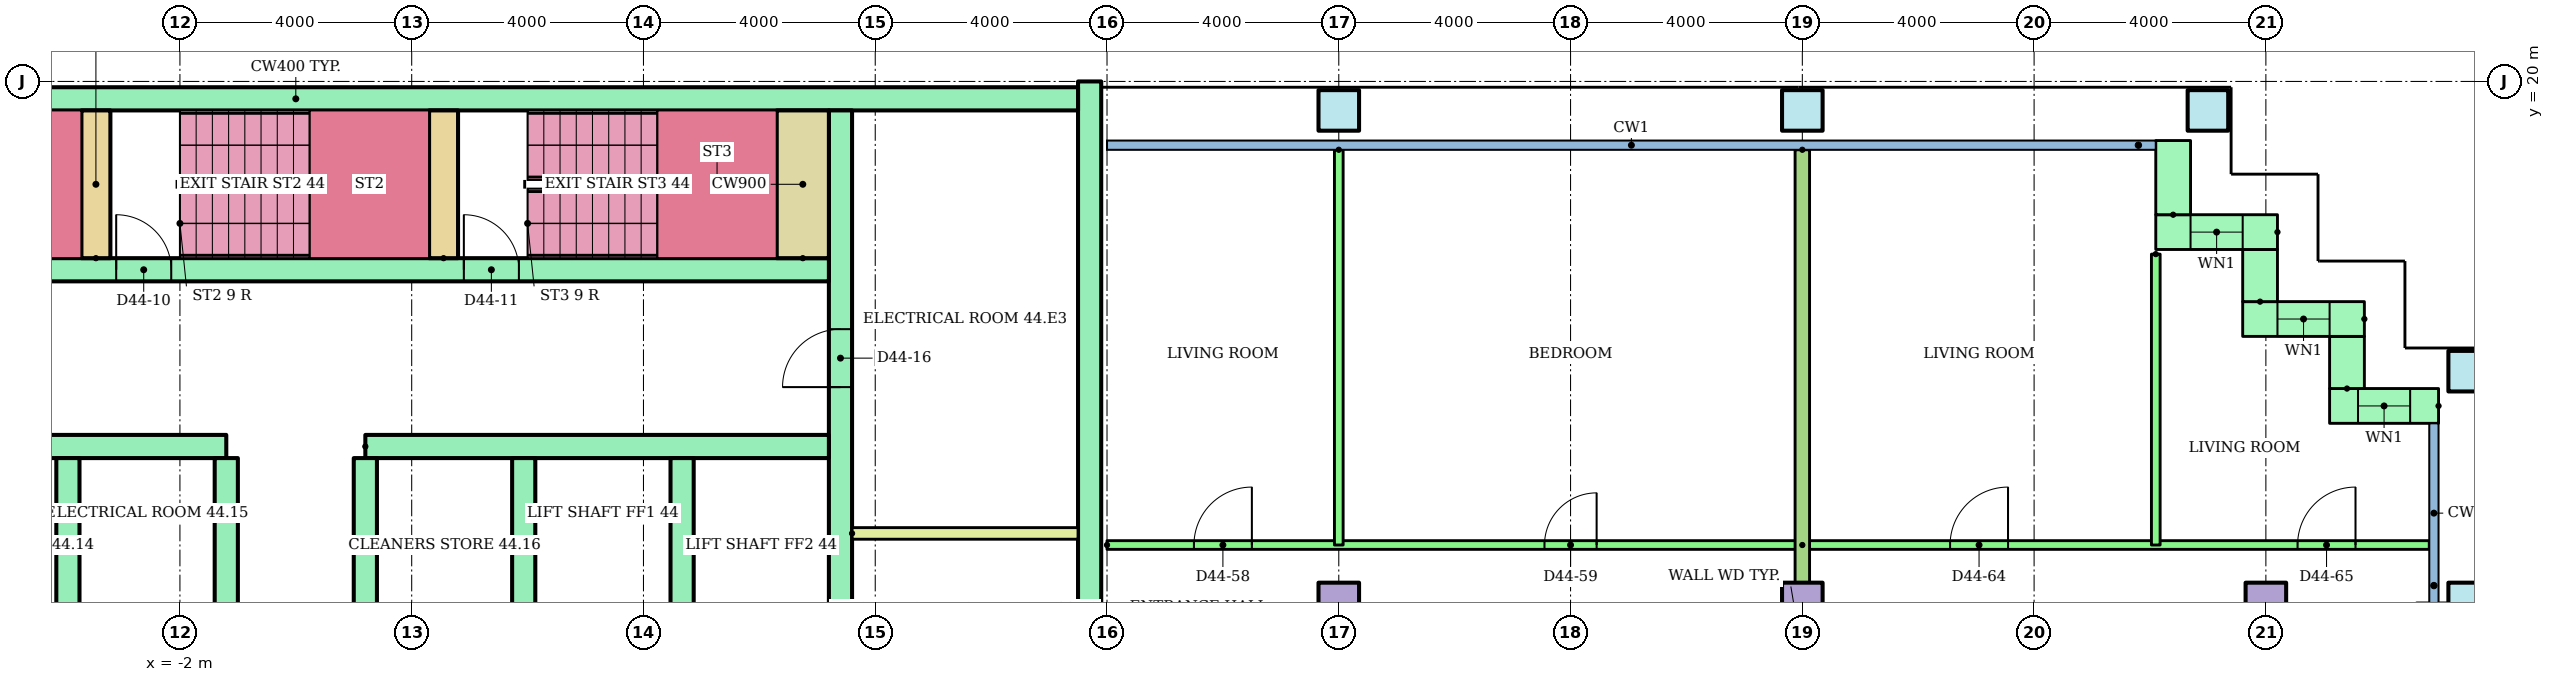
"""IFC4 building model, lengths in metres.
Left out: names, types, materials, properties, quantities, classifications, styles, units other than length and angle.
Written with IfcOpenShell. Run it as: python <this file> out.ifc"""

import sys

from ifc_helpers import new_model, si_unit, direction, frame, frame_2d, origin, origin_2d, place, context, subcontext, project, spatial, rectangle, hollow_rectangle, extrude, element, fill, save


model = new_model("IFC4")
c1 = context("Model", 3, precision=1e-05, world=origin(), true_north=direction((0.0, 1.0)))
c2 = subcontext(c1, "Body", "Model", "MODEL_VIEW")
j1 = project(units=[si_unit("LENGTHUNIT", "METRE"), si_unit("PLANEANGLEUNIT", "RADIAN")], contexts=[c1])
p1 = place(None, origin())
s1 = spatial("IfcSite", under=j1, at=p1, CompositionType="ELEMENT")
p2 = place(p1, origin())
s2 = spatial("IfcBuilding", under=s1, at=p2, CompositionType="ELEMENT")
p3 = place(p2, frame((0.0, 0.0, 171.7)))
s3 = spatial("IfcBuildingStorey", under=s2, at=p3, CompositionType="ELEMENT", Elevation=171.7)
for number, where in (
    (1, (18.0, 11.0, 0.0)),
    (2, (26.0, 11.0, 0.0)),
    (3, (34.0, 11.0, 0.0)),
):
    element("IfcColumn", number, at=place(p3, frame(where)), inside=s3, PredefinedType="COLUMN", context=c2, shape_type="SweptSolid", body=[
        extrude(rectangle(XDim=0.7, YDim=0.7, at=origin_2d()), origin(), (0.0, 0.0, 1.0), 3.2),
    ])
for number, where in (
    (4, (37.5, 11.0, 0.0)),
    (5, (37.5, 15.0, 0.0)),
    (6, (18.0, 19.5, 0.0)),
    (7, (26.0, 19.5, 0.0)),
    (8, (33.0, 19.5, 0.0)),
):
    element("IfcColumn", number, at=place(p3, frame(where)), inside=s3, PredefinedType="COLUMN", context=c2, shape_type="SweptSolid", body=[
        extrude(hollow_rectangle(XDim=0.7, YDim=0.7, WallThickness=0.036, at=origin_2d()), origin(), (0.0, 0.0, 1.0), 3.2),
    ])
p4 = place(p3, frame((36.98, 14.4, 0.0), z_axis=(0.0, 0.0, 1.0), x_axis=(-1.0, 0.0, 0.0)))
e9 = element("IfcWall", 9, at=p4, inside=s3, PredefinedType="STANDARD", context=c2, shape_type="SweptSolid", body=[
    extrude(rectangle(XDim=1.88, YDim=0.6, at=frame_2d((0.94, 0.0))), origin(), (0.0, 0.0, 1.0), 2.92),
])
p5 = place(p4, frame((0.49, 0.0, 0.9)))
e10 = element("IfcOpeningElement", 10, at=p5, cuts=e9, PredefinedType="OPENING", context=c2, shape_type="SweptSolid", body=[
    extrude(rectangle(XDim=0.9, YDim=1.5, at=frame_2d((0.45, 0.75))), frame((0.0, 0.31, 0.0), z_axis=(0.0, -1.0, 0.0), x_axis=(1.0, 0.0, 0.0)), (0.0, 0.0, 1.0), 0.62),
])
p6 = place(p3, frame((35.4, 14.7, 0.0), z_axis=(0.0, 0.0, 1.0), x_axis=(0.0, 1.0, 0.0)))
e11 = element("IfcWall", 11, at=p6, inside=s3, PredefinedType="STANDARD", context=c2, shape_type="SweptSolid", body=[
    extrude(rectangle(XDim=0.9, YDim=0.6, at=frame_2d((0.45, 0.0))), origin(), (0.0, 0.0, 1.0), 2.92),
])
p7 = place(p3, frame((35.7, 15.9, 0.0), z_axis=(0.0, 0.0, 1.0), x_axis=(-1.0, 0.0, 0.0)))
e12 = element("IfcWall", 12, at=p7, inside=s3, PredefinedType="STANDARD", context=c2, shape_type="SweptSolid", body=[
    extrude(rectangle(XDim=2.1, YDim=0.6, at=frame_2d((1.05, 0.0))), origin(), (0.0, 0.0, 1.0), 2.92),
])
p8 = place(p7, frame((0.6, 0.0, 0.9)))
e13 = element("IfcOpeningElement", 13, at=p8, cuts=e12, PredefinedType="OPENING", context=c2, shape_type="SweptSolid", body=[
    extrude(rectangle(XDim=0.9, YDim=1.5, at=frame_2d((0.45, 0.75))), frame((0.0, 0.31, 0.0), z_axis=(0.0, -1.0, 0.0), x_axis=(1.0, 0.0, 0.0)), (0.0, 0.0, 1.0), 0.62),
])
p9 = place(p3, frame((33.9, 16.2, 0.0), z_axis=(0.0, 0.0, 1.0), x_axis=(0.0, 1.0, 0.0)))
e14 = element("IfcWall", 14, at=p9, inside=s3, PredefinedType="STANDARD", context=c2, shape_type="SweptSolid", body=[
    extrude(rectangle(XDim=0.9, YDim=0.6, at=frame_2d((0.45, 0.0))), origin(), (0.0, 0.0, 1.0), 2.92),
])
p10 = place(p3, frame((34.2, 17.4, 0.0), z_axis=(0.0, 0.0, 1.0), x_axis=(-1.0, 0.0, 0.0)))
e15 = element("IfcWall", 15, at=p10, inside=s3, PredefinedType="STANDARD", context=c2, shape_type="SweptSolid", body=[
    extrude(rectangle(XDim=2.1, YDim=0.6, at=frame_2d((1.05, 0.0))), origin(), (0.0, 0.0, 1.0), 2.92),
])
p11 = place(p10, frame((0.6, 0.0, 0.9)))
e16 = element("IfcOpeningElement", 16, at=p11, cuts=e15, PredefinedType="OPENING", context=c2, shape_type="SweptSolid", body=[
    extrude(rectangle(XDim=0.9, YDim=1.5, at=frame_2d((0.45, 0.75))), frame((0.0, 0.31, 0.0), z_axis=(0.0, -1.0, 0.0), x_axis=(1.0, 0.0, 0.0)), (0.0, 0.0, 1.0), 0.62),
])
p12 = place(p3, frame((32.4, 17.7, 0.0), z_axis=(0.0, 0.0, 1.0), x_axis=(0.0, 1.0, 0.0)))
e17 = element("IfcWall", 17, at=p12, inside=s3, PredefinedType="STANDARD", context=c2, shape_type="SweptSolid", body=[
    extrude(rectangle(XDim=1.28, YDim=0.6, at=frame_2d((0.64, 0.0))), origin(), (0.0, 0.0, 1.0), 2.92),
])
p13 = place(p3, frame((13.7, 3.0, 0.0), z_axis=(0.0, 0.0, 1.0), x_axis=(0.0, 1.0, 0.0)))
e18 = element("IfcWall", 18, at=p13, inside=s3, PredefinedType="SHEAR", context=c2, shape_type="SweptSolid", body=[
    extrude(rectangle(XDim=17.0, YDim=0.4, at=frame_2d((8.5, 0.0))), origin(), (0.0, 0.0, 1.0), 2.92),
])
p14 = place(p3, frame((-13.5, 19.7, 0.0)))
e19 = element("IfcWall", 19, at=p14, inside=s3, PredefinedType="SHEAR", context=c2, shape_type="SweptSolid", body=[
    extrude(rectangle(XDim=27.0, YDim=0.4, at=frame_2d((13.5, 0.0))), origin(), (0.0, 0.0, 1.0), 2.92),
])
p15 = place(p3, frame((9.4, 6.8, 0.0), z_axis=(0.0, 0.0, 1.0), x_axis=(0.0, 1.0, 0.0)))
e20 = element("IfcWall", 20, at=p15, inside=s3, PredefinedType="SHEAR", context=c2, shape_type="SweptSolid", body=[
    extrude(rectangle(XDim=12.7, YDim=0.4, at=frame_2d((6.35, 0.0))), origin(), (0.0, 0.0, 1.0), 2.92),
])
p16 = place(p15, frame((0.3, 0.0, 0.0)))
e21 = element("IfcOpeningElement", 21, at=p16, cuts=e20, PredefinedType="OPENING", context=c2, shape_type="SweptSolid", body=[
    extrude(rectangle(XDim=1.0, YDim=2.1, at=frame_2d((0.5, 1.05))), frame((0.0, 0.21, 0.0), z_axis=(0.0, -1.0, 0.0), x_axis=(1.0, 0.0, 0.0)), (0.0, 0.0, 1.0), 0.42),
])
p17 = place(p15, frame((2.05, 0.0, 0.0)))
e22 = element("IfcOpeningElement", 22, at=p17, cuts=e20, PredefinedType="OPENING", context=c2, shape_type="SweptSolid", body=[
    extrude(rectangle(XDim=1.0, YDim=2.1, at=frame_2d((0.5, 1.05))), frame((0.0, 0.21, 0.0), z_axis=(0.0, -1.0, 0.0), x_axis=(1.0, 0.0, 0.0)), (0.0, 0.0, 1.0), 0.42),
])
p18 = place(p15, frame((7.925, 0.0, 0.0)))
e23 = element("IfcOpeningElement", 23, at=p18, cuts=e20, PredefinedType="OPENING", context=c2, shape_type="SweptSolid", body=[
    extrude(rectangle(XDim=1.0, YDim=2.1, at=frame_2d((0.5, 1.05))), frame((0.0, 0.21, 0.0), z_axis=(0.0, -1.0, 0.0), x_axis=(1.0, 0.0, 0.0)), (0.0, 0.0, 1.0), 0.42),
])
for number, where in (
    (24, (-9.2, 13.7, 0.0)),
    (25, (1.2, 13.7, 0.0)),
):
    element("IfcWall", number, at=place(p3, frame(where)), inside=s3, PredefinedType="SHEAR", context=c2, shape_type="SweptSolid", body=[
        extrude(rectangle(XDim=8.0, YDim=0.4, at=frame_2d((4.0, 0.0))), origin(), (0.0, 0.0, 1.0), 2.92),
    ])
for number, where, z_axis, x_axis in (
    (26, (-3.933, 10.5, 0.0), (0.0, 0.0, 1.0), (0.0, 1.0, 0.0)),
    (27, (-1.2, 10.5, 0.0), (0.0, 0.0, 1.0), (0.0, 1.0, 0.0)),
    (28, (1.2, 10.5, 0.0), (0.0, 0.0, 1.0), (0.0, 1.0, 0.0)),
    (29, (3.933, 10.5, 0.0), (0.0, 0.0, 1.0), (0.0, 1.0, 0.0)),
    (30, (6.667, 10.5, 0.0), (0.0, 0.0, 1.0), (0.0, 1.0, 0.0)),
):
    element("IfcWall", number, at=place(p3, frame(where, z_axis=z_axis, x_axis=x_axis)), inside=s3, PredefinedType="SHEAR", context=c2, shape_type="SweptSolid", body=[
        extrude(rectangle(XDim=3.0, YDim=0.4, at=frame_2d((1.5, 0.0))), origin(), (0.0, 0.0, 1.0), 2.92),
    ])
p19 = place(p3, frame((-9.2, 16.75, 0.0)))
e31 = element("IfcWall", 31, at=p19, inside=s3, PredefinedType="SHEAR", context=c2, shape_type="SweptSolid", body=[
    extrude(rectangle(XDim=18.4, YDim=0.4, at=frame_2d((9.2, 0.0))), origin(), (0.0, 0.0, 1.0), 2.92),
])
p20 = place(p19, frame((0.1, 0.0, 0.0)))
e32 = element("IfcOpeningElement", 32, at=p20, cuts=e31, PredefinedType="OPENING", context=c2, shape_type="SweptSolid", body=[
    extrude(rectangle(XDim=0.95, YDim=2.1, at=frame_2d((0.475, 1.05))), frame((0.0, 0.21, 0.0), z_axis=(0.0, -1.0, 0.0), x_axis=(1.0, 0.0, 0.0)), (0.0, 0.0, 1.0), 0.42),
])
p21 = place(p19, frame((6.1, 0.0, 0.0)))
e33 = element("IfcOpeningElement", 33, at=p21, cuts=e31, PredefinedType="OPENING", context=c2, shape_type="SweptSolid", body=[
    extrude(rectangle(XDim=0.95, YDim=2.1, at=frame_2d((0.475, 1.05))), frame((0.0, 0.21, 0.0), z_axis=(0.0, -1.0, 0.0), x_axis=(1.0, 0.0, 0.0)), (0.0, 0.0, 1.0), 0.42),
])
p22 = place(p19, frame((12.1, 0.0, 0.0)))
e34 = element("IfcOpeningElement", 34, at=p22, cuts=e31, PredefinedType="OPENING", context=c2, shape_type="SweptSolid", body=[
    extrude(rectangle(XDim=0.95, YDim=2.1, at=frame_2d((0.475, 1.05))), frame((0.0, 0.21, 0.0), z_axis=(0.0, -1.0, 0.0), x_axis=(1.0, 0.0, 0.0)), (0.0, 0.0, 1.0), 0.42),
])
for number, where, z_axis, x_axis in (
    (35, (-3.45, 16.95, 0.0), (0.0, 0.0, 1.0), (0.0, 1.0, 0.0)),
    (36, (2.55, 16.95, 0.0), (0.0, 0.0, 1.0), (0.0, 1.0, 0.0)),
):
    element("IfcWall", number, at=place(p3, frame(where, z_axis=z_axis, x_axis=x_axis)), inside=s3, PredefinedType="SHEAR", context=c2, shape_type="SweptSolid", body=[
        extrude(rectangle(XDim=2.55, YDim=0.5, at=frame_2d((1.275, 0.0))), origin(), (0.0, 0.0, 1.0), 2.92),
    ])
p23 = place(p3, frame((8.75, 16.95, 0.0), z_axis=(0.0, 0.0, 1.0), x_axis=(0.0, 1.0, 0.0)))
e37 = element("IfcWall", 37, at=p23, inside=s3, PredefinedType="SHEAR", context=c2, shape_type="SweptSolid", body=[
    extrude(rectangle(XDim=2.55, YDim=0.9, at=frame_2d((1.275, 0.0))), origin(), (0.0, 0.0, 1.0), 2.92),
])
p24 = place(p3, frame((9.6, 12.2, 0.0)))
e38 = element("IfcWall", 38, at=p24, inside=s3, PredefinedType="PARTITIONING", context=c2, shape_type="SweptSolid", body=[
    extrude(rectangle(XDim=3.9, YDim=0.2, at=frame_2d((1.95, 0.0))), origin(), (0.0, 0.0, 1.0), 2.92),
])
p25 = place(p3, frame((14.0, 12.0, 0.0)))
e39 = element("IfcWall", 39, at=p25, inside=s3, PredefinedType="PARTITIONING", context=c2, shape_type="SweptSolid", body=[
    extrude(rectangle(XDim=12.0, YDim=0.15, at=frame_2d((6.0, 0.0))), origin(), (0.0, 0.0, 1.0), 2.4),
])
p26 = place(p25, frame((1.5, 0.0, 0.0)))
e40 = element("IfcOpeningElement", 40, at=p26, cuts=e39, PredefinedType="OPENING", context=c2, shape_type="SweptSolid", body=[
    extrude(rectangle(XDim=1.0, YDim=2.1, at=frame_2d((0.5, 1.05))), frame((0.0, 0.085, 0.0), z_axis=(0.0, -1.0, 0.0), x_axis=(1.0, 0.0, 0.0)), (0.0, 0.0, 1.0), 0.17),
])
p27 = place(p25, frame((7.55, 0.0, 0.0)))
e41 = element("IfcOpeningElement", 41, at=p27, cuts=e39, PredefinedType="OPENING", context=c2, shape_type="SweptSolid", body=[
    extrude(rectangle(XDim=0.9, YDim=2.1, at=frame_2d((0.45, 1.05))), frame((0.0, 0.085, 0.0), z_axis=(0.0, -1.0, 0.0), x_axis=(1.0, 0.0, 0.0)), (0.0, 0.0, 1.0), 0.17),
])
p28 = place(p3, frame((18.0, 18.821, 0.0), z_axis=(0.0, 0.0, 1.0), x_axis=(0.0, -1.0, 0.0)))
e42 = element("IfcWall", 42, at=p28, inside=s3, PredefinedType="PARTITIONING", context=c2, shape_type="SweptSolid", body=[
    extrude(rectangle(XDim=6.821, YDim=0.15, at=frame_2d((3.411, 0.0))), origin(), (0.0, 0.0, 1.0), 2.4),
])
p29 = place(p3, frame((26.0, 12.0, 0.0)))
e43 = element("IfcWall", 43, at=p29, inside=s3, PredefinedType="PARTITIONING", context=c2, shape_type="SweptSolid", body=[
    extrude(rectangle(XDim=10.82, YDim=0.15, at=frame_2d((5.41, 0.0))), origin(), (0.0, 0.0, 1.0), 2.4),
])
p30 = place(p29, frame((2.55, 0.0, 0.0)))
e44 = element("IfcOpeningElement", 44, at=p30, cuts=e43, PredefinedType="OPENING", context=c2, shape_type="SweptSolid", body=[
    extrude(rectangle(XDim=1.0, YDim=2.1, at=frame_2d((0.5, 1.05))), frame((0.0, 0.085, 0.0), z_axis=(0.0, -1.0, 0.0), x_axis=(1.0, 0.0, 0.0)), (0.0, 0.0, 1.0), 0.17),
])
p31 = place(p29, frame((8.547, 0.0, 0.0)))
e45 = element("IfcOpeningElement", 45, at=p31, cuts=e43, PredefinedType="OPENING", context=c2, shape_type="SweptSolid", body=[
    extrude(rectangle(XDim=1.0, YDim=2.1, at=frame_2d((0.5, 1.05))), frame((0.0, 0.085, 0.0), z_axis=(0.0, -1.0, 0.0), x_axis=(1.0, 0.0, 0.0)), (0.0, 0.0, 1.0), 0.17),
])
p32 = place(p3, frame((32.1, 17.02, 0.0), z_axis=(0.0, 0.0, 1.0), x_axis=(0.0, -1.0, 0.0)))
e46 = element("IfcWall", 46, at=p32, inside=s3, PredefinedType="PARTITIONING", context=c2, shape_type="SweptSolid", body=[
    extrude(rectangle(XDim=5.02, YDim=0.15, at=frame_2d((2.51, 0.0))), origin(), (0.0, 0.0, 1.0), 2.4),
])
p33 = place(p3, frame((26.0, 18.821, 0.0), z_axis=(0.0, 0.0, 1.0), x_axis=(0.0, -1.0, 0.0)))
e47 = element("IfcWall", 47, at=p33, inside=s3, PredefinedType="PARTITIONING", context=c2, shape_type="SweptSolid", body=[
    extrude(rectangle(XDim=17.421, YDim=0.25, at=frame_2d((8.71, 0.0))), origin(), (0.0, 0.0, 1.0), 2.4),
])
p34 = place(p5, origin())
e48 = element("IfcWindow", 48, at=p34, inside=s3, PartitioningType="SINGLE_PANEL", PredefinedType="WINDOW", context=c2, shape_type="SweptSolid", body=[
    extrude(rectangle(XDim=0.9, YDim=1.5, at=frame_2d((0.45, 0.75))), frame((0.0, 0.03, 0.0), z_axis=(0.0, -1.0, 0.0), x_axis=(1.0, 0.0, 0.0)), (0.0, 0.0, 1.0), 0.06),
])
fill(e10, e48)
p35 = place(p8, origin())
e49 = element("IfcWindow", 49, at=p35, inside=s3, PartitioningType="SINGLE_PANEL", PredefinedType="WINDOW", context=c2, shape_type="SweptSolid", body=[
    extrude(rectangle(XDim=0.9, YDim=1.5, at=frame_2d((0.45, 0.75))), frame((0.0, 0.03, 0.0), z_axis=(0.0, -1.0, 0.0), x_axis=(1.0, 0.0, 0.0)), (0.0, 0.0, 1.0), 0.06),
])
fill(e13, e49)
p36 = place(p11, origin())
e50 = element("IfcWindow", 50, at=p36, inside=s3, PartitioningType="SINGLE_PANEL", PredefinedType="WINDOW", context=c2, shape_type="SweptSolid", body=[
    extrude(rectangle(XDim=0.9, YDim=1.5, at=frame_2d((0.45, 0.75))), frame((0.0, 0.03, 0.0), z_axis=(0.0, -1.0, 0.0), x_axis=(1.0, 0.0, 0.0)), (0.0, 0.0, 1.0), 0.06),
])
fill(e16, e50)
p37 = place(p21, origin())
e51 = element("IfcDoor", 51, at=p37, inside=s3, OperationType="SINGLE_SWING_LEFT", PredefinedType="DOOR", context=c2, shape_type="SweptSolid", body=[
    extrude(rectangle(XDim=0.95, YDim=2.1, at=frame_2d((0.475, 1.05))), frame((0.0, 0.025, 0.0), z_axis=(0.0, -1.0, 0.0), x_axis=(1.0, 0.0, 0.0)), (0.0, 0.0, 1.0), 0.05),
])
fill(e33, e51)
p38 = place(p22, origin())
e52 = element("IfcDoor", 52, at=p38, inside=s3, OperationType="SINGLE_SWING_LEFT", PredefinedType="DOOR", context=c2, shape_type="SweptSolid", body=[
    extrude(rectangle(XDim=0.95, YDim=2.1, at=frame_2d((0.475, 1.05))), frame((0.0, 0.025, 0.0), z_axis=(0.0, -1.0, 0.0), x_axis=(1.0, 0.0, 0.0)), (0.0, 0.0, 1.0), 0.05),
])
fill(e34, e52)
p39 = place(p18, origin())
e53 = element("IfcDoor", 53, at=p39, inside=s3, OperationType="SINGLE_SWING_LEFT", PredefinedType="DOOR", context=c2, shape_type="SweptSolid", body=[
    extrude(rectangle(XDim=1.0, YDim=2.1, at=frame_2d((0.5, 1.05))), frame((0.0, 0.025, 0.0), z_axis=(0.0, -1.0, 0.0), x_axis=(1.0, 0.0, 0.0)), (0.0, 0.0, 1.0), 0.05),
])
fill(e23, e53)
p40 = place(p26, origin())
e54 = element("IfcDoor", 54, at=p40, inside=s3, OperationType="SINGLE_SWING_RIGHT", PredefinedType="DOOR", context=c2, shape_type="SweptSolid", body=[
    extrude(rectangle(XDim=1.0, YDim=2.1, at=frame_2d((0.5, 1.05))), frame((0.0, 0.025, 0.0), z_axis=(0.0, -1.0, 0.0), x_axis=(1.0, 0.0, 0.0)), (0.0, 0.0, 1.0), 0.05),
])
fill(e40, e54)
p41 = place(p27, origin())
e55 = element("IfcDoor", 55, at=p41, inside=s3, OperationType="SINGLE_SWING_RIGHT", PredefinedType="DOOR", context=c2, shape_type="SweptSolid", body=[
    extrude(rectangle(XDim=0.9, YDim=2.1, at=frame_2d((0.45, 1.05))), frame((0.0, 0.025, 0.0), z_axis=(0.0, -1.0, 0.0), x_axis=(1.0, 0.0, 0.0)), (0.0, 0.0, 1.0), 0.05),
])
fill(e41, e55)
p42 = place(p30, origin())
e56 = element("IfcDoor", 56, at=p42, inside=s3, OperationType="SINGLE_SWING_RIGHT", PredefinedType="DOOR", context=c2, shape_type="SweptSolid", body=[
    extrude(rectangle(XDim=1.0, YDim=2.1, at=frame_2d((0.5, 1.05))), frame((0.0, 0.025, 0.0), z_axis=(0.0, -1.0, 0.0), x_axis=(1.0, 0.0, 0.0)), (0.0, 0.0, 1.0), 0.05),
])
fill(e44, e56)
p43 = place(p31, origin())
e57 = element("IfcDoor", 57, at=p43, inside=s3, OperationType="SINGLE_SWING_RIGHT", PredefinedType="DOOR", context=c2, shape_type="SweptSolid", body=[
    extrude(rectangle(XDim=1.0, YDim=2.1, at=frame_2d((0.5, 1.05))), frame((0.0, 0.025, 0.0), z_axis=(0.0, -1.0, 0.0), x_axis=(1.0, 0.0, 0.0)), (0.0, 0.0, 1.0), 0.05),
])
fill(e45, e57)
save(model, sys.argv[1])
